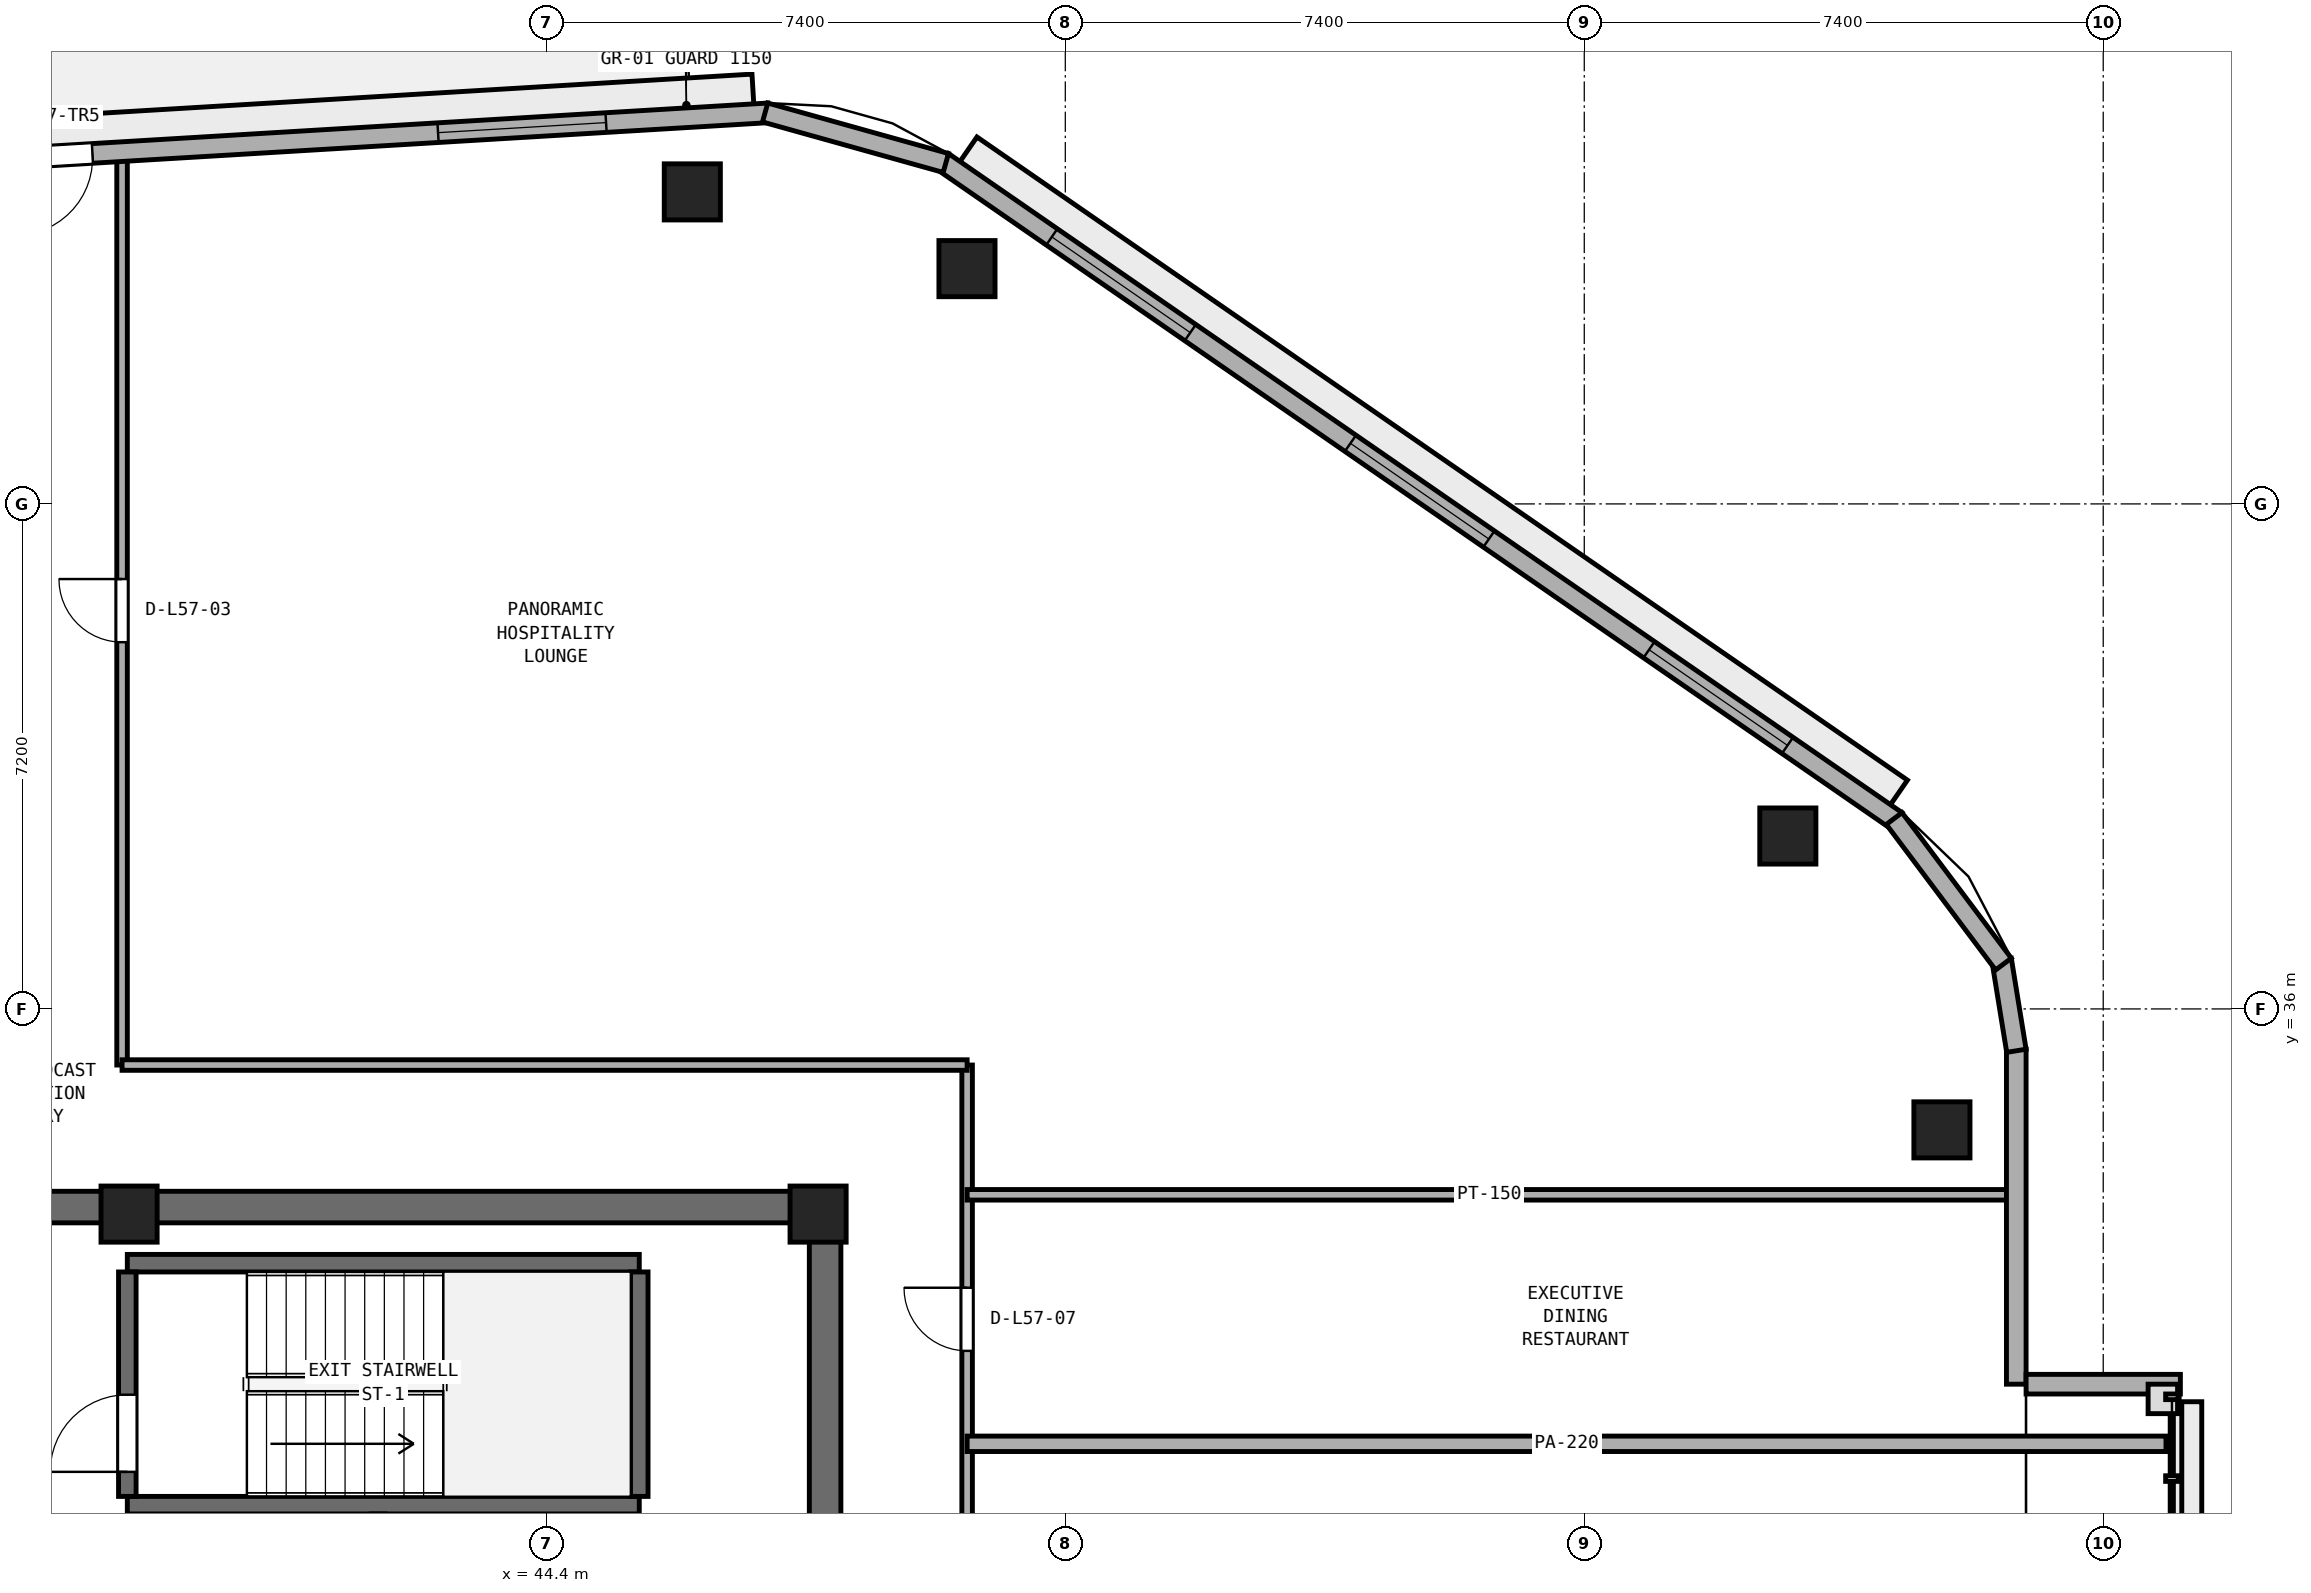
"""IFC4 building model, lengths in metres.
Left out: names, types, materials, properties, quantities, classifications, styles, units other than length and angle.
Written with IfcOpenShell. Run it as: python <this file> out.ifc"""

import sys

from ifc_helpers import new_model, si_unit, direction, frame, frame_2d, origin, origin_2d, place, context, subcontext, project, spatial, rectangle, extrude, element, fill, save


model = new_model("IFC4")
c1 = context("Model", 3, precision=1e-05, world=origin(), true_north=direction((0.0, 1.0)))
c2 = subcontext(c1, "Body", "Model", "MODEL_VIEW")
j1 = project(units=[si_unit("LENGTHUNIT", "METRE"), si_unit("PLANEANGLEUNIT", "RADIAN")], contexts=[c1])
p1 = place(None, origin())
s1 = spatial("IfcSite", under=j1, at=p1, CompositionType="ELEMENT")
p2 = place(p1, origin())
s2 = spatial("IfcBuilding", under=s1, at=p2, CompositionType="ELEMENT")
p3 = place(p2, frame((0.0, 0.0, 225.0)))
s3 = spatial("IfcBuildingStorey", under=s2, at=p3, CompositionType="ELEMENT", Elevation=225.0)
p4 = place(p3, frame((25.4, 33.175, 0.0), z_axis=(0.0, 0.0, 1.0), x_axis=(1.0, 0.0, 0.0)))
e1 = element("IfcWall", 1, at=p4, inside=s3, PredefinedType="SHEAR", context=c2, shape_type="SweptSolid", body=[
    extrude(rectangle(XDim=23.2, YDim=0.45, at=frame_2d((11.6, 0.0))), origin(), (0.0, 0.0, 1.0), 3.51),
])
p5 = place(p3, frame((48.375, 17.45, 0.0), z_axis=(0.0, 0.0, 1.0), x_axis=(0.0, 1.0, 0.0)))
e2 = element("IfcWall", 2, at=p5, inside=s3, PredefinedType="SHEAR", context=c2, shape_type="SweptSolid", body=[
    extrude(rectangle(XDim=15.5, YDim=0.45, at=frame_2d((7.75, 0.0))), origin(), (0.0, 0.0, 1.0), 3.51),
])
p6 = place(p5, frame((5.85, 0.0, 0.0)))
e3 = element("IfcOpeningElement", 3, at=p6, cuts=e2, PredefinedType="OPENING", context=c2, shape_type="SweptSolid", body=[
    extrude(rectangle(XDim=1.5, YDim=2.15, at=frame_2d((0.75, 1.075))), frame((0.0, 0.235, 0.0), z_axis=(0.0, -1.0, 0.0), x_axis=(1.0, 0.0, 0.0)), (0.0, 0.0, 1.0), 0.47),
])
for number, where, z_axis, x_axis in (
    (4, (48.275, 33.075, 0.0), (0.0, 0.0, 1.0), (1.0, 0.0, 0.0)),
    (5, (38.45, 33.075, 0.0), (0.0, 0.0, 1.0), (1.0, 0.0, 0.0)),
):
    element("IfcColumn", number, at=place(p3, frame(where, z_axis=z_axis, x_axis=x_axis)), inside=s3, PredefinedType="PILASTER", context=c2, shape_type="SweptSolid", body=[
        extrude(rectangle(XDim=0.8, YDim=0.8, at=origin_2d()), origin(), (0.0, 0.0, 1.0), 3.8),
    ])
for number, where, z_axis, x_axis in (
    (6, (64.3, 34.276, 0.0), (0.0, 0.0, 1.0), (1.0, 0.0, 0.0)),
    (7, (62.103, 38.465, 0.0), (0.0, 0.0, 1.0), (1.0, 0.0, 0.0)),
    (8, (50.398, 46.554, 0.0), (0.0, 0.0, 1.0), (1.0, 0.0, 0.0)),
    (9, (46.481, 47.648, 0.0), (0.0, 0.0, 1.0), (1.0, 0.0, 0.0)),
):
    element("IfcColumn", number, at=place(p3, frame(where, z_axis=z_axis, x_axis=x_axis)), inside=s3, PredefinedType="COLUMN", context=c2, shape_type="SweptSolid", body=[
        extrude(rectangle(XDim=0.8, YDim=0.8, at=origin_2d()), origin(), (0.0, 0.0, 1.0), 3.8),
    ])
for number, where, z_axis, x_axis in (
    (10, (38.425, 28.925, 0.0), (0.0, 0.0, 1.0), (1.0, 0.0, 0.0)),
    (11, (38.425, 32.375, 0.0), (0.0, 0.0, 1.0), (1.0, 0.0, 0.0)),
):
    element("IfcWall", number, at=place(p3, frame(where, z_axis=z_axis, x_axis=x_axis)), inside=s3, PredefinedType="SHEAR", context=c2, shape_type="SweptSolid", body=[
        extrude(rectangle(XDim=7.3, YDim=0.25, at=frame_2d((3.65, 0.0))), origin(), (0.0, 0.0, 1.0), 3.51),
    ])
p7 = place(p3, frame((38.425, 29.05, 0.0), z_axis=(0.0, 0.0, 1.0), x_axis=(0.0, 1.0, 0.0)))
e12 = element("IfcWall", 12, at=p7, inside=s3, PredefinedType="SHEAR", context=c2, shape_type="SweptSolid", body=[
    extrude(rectangle(XDim=3.2, YDim=0.25, at=frame_2d((1.6, 0.0))), origin(), (0.0, 0.0, 1.0), 3.51),
])
p8 = place(p7, frame((0.35, 0.0, 0.0)))
e13 = element("IfcOpeningElement", 13, at=p8, cuts=e12, PredefinedType="OPENING", context=c2, shape_type="SweptSolid", body=[
    extrude(rectangle(XDim=1.1, YDim=2.15, at=frame_2d((0.55, 1.075))), frame((0.0, 0.135, 0.0), z_axis=(0.0, -1.0, 0.0), x_axis=(1.0, 0.0, 0.0)), (0.0, 0.0, 1.0), 0.27),
])
p9 = place(p3, frame((45.725, 29.05, 0.0), z_axis=(0.0, 0.0, 1.0), x_axis=(0.0, 1.0, 0.0)))
e14 = element("IfcWall", 14, at=p9, inside=s3, PredefinedType="SHEAR", context=c2, shape_type="SweptSolid", body=[
    extrude(rectangle(XDim=3.2, YDim=0.25, at=frame_2d((1.6, 0.0))), origin(), (0.0, 0.0, 1.0), 3.51),
])
p10 = place(p3, frame((50.4, 22.6, 0.0), z_axis=(0.0, 0.0, 1.0), x_axis=(0.0, 1.0, 0.0)))
e15 = element("IfcWall", 15, at=p10, inside=s3, PredefinedType="PARTITIONING", context=c2, shape_type="SweptSolid", body=[
    extrude(rectangle(XDim=12.6, YDim=0.15, at=frame_2d((6.3, 0.0))), origin(), (0.0, 0.0, 1.0), 3.51),
])
p11 = place(p10, frame((3.22, 0.0, 0.0)))
e16 = element("IfcOpeningElement", 16, at=p11, cuts=e15, PredefinedType="OPENING", context=c2, shape_type="SweptSolid", body=[
    extrude(rectangle(XDim=1.0, YDim=2.12, at=frame_2d((0.5, 1.06))), frame((0.0, 0.085, 0.0), z_axis=(0.0, -1.0, 0.0), x_axis=(1.0, 0.0, 0.0)), (0.0, 0.0, 1.0), 0.17),
])
p12 = place(p10, frame((8.525, 0.0, 0.0)))
e17 = element("IfcOpeningElement", 17, at=p12, cuts=e15, PredefinedType="OPENING", context=c2, shape_type="SweptSolid", body=[
    extrude(rectangle(XDim=0.9, YDim=2.1, at=frame_2d((0.45, 1.05))), frame((0.0, 0.085, 0.0), z_axis=(0.0, -1.0, 0.0), x_axis=(1.0, 0.0, 0.0)), (0.0, 0.0, 1.0), 0.17),
])
p13 = place(p3, frame((38.35, 35.2, 0.0), z_axis=(0.0, 0.0, 1.0), x_axis=(0.0, 1.0, 0.0)))
e18 = element("IfcWall", 18, at=p13, inside=s3, PredefinedType="PARTITIONING", context=c2, shape_type="SweptSolid", body=[
    extrude(rectangle(XDim=12.958, YDim=0.15, at=frame_2d((6.479, 0.0))), origin(), (0.0, 0.0, 1.0), 3.51),
])
p14 = place(p13, frame((6.029, 0.0, 0.0)))
e19 = element("IfcOpeningElement", 19, at=p14, cuts=e18, PredefinedType="OPENING", context=c2, shape_type="SweptSolid", body=[
    extrude(rectangle(XDim=0.9, YDim=2.1, at=frame_2d((0.45, 1.05))), frame((0.0, 0.085, 0.0), z_axis=(0.0, -1.0, 0.0), x_axis=(1.0, 0.0, 0.0)), (0.0, 0.0, 1.0), 0.17),
])
p15 = place(p3, frame((50.4, 29.8, 0.0), z_axis=(0.0, 0.0, 1.0), x_axis=(1.0, 0.0, 0.0)))
e20 = element("IfcWall", 20, at=p15, inside=s3, PredefinedType="PARTITIONING", context=c2, shape_type="SweptSolid", body=[
    extrude(rectangle(XDim=17.095, YDim=0.22, at=frame_2d((8.548, 0.0))), origin(), (0.0, 0.0, 1.0), 3.51),
])
p16 = place(p3, frame((50.4, 33.35, 0.0), z_axis=(0.0, 0.0, 1.0), x_axis=(1.0, 0.0, 0.0)))
e21 = element("IfcWall", 21, at=p16, inside=s3, PredefinedType="PARTITIONING", context=c2, shape_type="SweptSolid", body=[
    extrude(rectangle(XDim=14.895, YDim=0.15, at=frame_2d((7.448, 0.0))), origin(), (0.0, 0.0, 1.0), 2.893),
])
p17 = place(p3, frame((38.35, 35.2, 0.0), z_axis=(0.0, 0.0, 1.0), x_axis=(1.0, 0.0, 0.0)))
e22 = element("IfcWall", 22, at=p17, inside=s3, PredefinedType="PARTITIONING", context=c2, shape_type="SweptSolid", body=[
    extrude(rectangle(XDim=12.05, YDim=0.15, at=frame_2d((6.025, 0.0))), origin(), (0.0, 0.0, 1.0), 3.51),
])
p18 = place(p3, frame((65.36, 30.65, 0.0), z_axis=(0.0, 0.0, 1.0), x_axis=(0.0, 1.0, 0.0)))
e23 = element("IfcWall", 23, at=p18, inside=s3, PredefinedType="STANDARD", context=c2, shape_type="SweptSolid", body=[
    extrude(rectangle(XDim=4.776, YDim=0.28, at=frame_2d((2.388, 0.0))), origin(), (0.0, 0.0, 1.0), 3.51),
])
p19 = place(p3, frame((63.651, 38.683, 0.0), z_axis=(0.0, 0.0, 1.0), x_axis=(-0.822655095, 0.568540759022, 0.0)))
e24 = element("IfcWall", 24, at=p19, inside=s3, PredefinedType="STANDARD", context=c2, shape_type="SweptSolid", body=[
    extrude(rectangle(XDim=16.528, YDim=0.28, at=frame_2d((8.264, 0.0))), origin(), (0.0, 0.0, 1.0), 3.51),
])
p20 = place(p19, frame((1.888, 0.0, 0.9)))
e25 = element("IfcOpeningElement", 25, at=p20, cuts=e24, PredefinedType="OPENING", context=c2, shape_type="SweptSolid", body=[
    extrude(rectangle(XDim=2.4, YDim=1.75, at=frame_2d((1.2, 0.875))), frame((0.0, 0.15, 0.0), z_axis=(0.0, -1.0, 0.0), x_axis=(1.0, 0.0, 0.0)), (0.0, 0.0, 1.0), 0.3),
])
p21 = place(p19, frame((7.064, 0.0, 0.9)))
e26 = element("IfcOpeningElement", 26, at=p21, cuts=e24, PredefinedType="OPENING", context=c2, shape_type="SweptSolid", body=[
    extrude(rectangle(XDim=2.4, YDim=1.75, at=frame_2d((1.2, 0.875))), frame((0.0, 0.15, 0.0), z_axis=(0.0, -1.0, 0.0), x_axis=(1.0, 0.0, 0.0)), (0.0, 0.0, 1.0), 0.3),
])
p22 = place(p19, frame((12.24, 0.0, 0.9)))
e27 = element("IfcOpeningElement", 27, at=p22, cuts=e24, PredefinedType="OPENING", context=c2, shape_type="SweptSolid", body=[
    extrude(rectangle(XDim=2.4, YDim=1.75, at=frame_2d((1.2, 0.875))), frame((0.0, 0.15, 0.0), z_axis=(0.0, -1.0, 0.0), x_axis=(1.0, 0.0, 0.0)), (0.0, 0.0, 1.0), 0.3),
])
p23 = place(p3, frame((47.566, 48.775, 0.0), z_axis=(0.0, 0.0, 1.0), x_axis=(-0.998202767485, -0.059926913695, 0.0)))
e28 = element("IfcWall", 28, at=p23, inside=s3, PredefinedType="STANDARD", context=c2, shape_type="SweptSolid", body=[
    extrude(rectangle(XDim=19.111, YDim=0.28, at=frame_2d((9.556, 0.0))), origin(), (0.0, 0.0, 1.0), 3.51),
])
p24 = place(p23, frame((9.656, 0.0, 0.0)))
e29 = element("IfcOpeningElement", 29, at=p24, cuts=e28, PredefinedType="OPENING", context=c2, shape_type="SweptSolid", body=[
    extrude(rectangle(XDim=1.1, YDim=2.2, at=frame_2d((0.55, 1.1))), frame((0.0, 0.15, 0.0), z_axis=(0.0, -1.0, 0.0), x_axis=(1.0, 0.0, 0.0)), (0.0, 0.0, 1.0), 0.3),
])
p25 = place(p23, frame((2.319, 0.0, 0.9)))
e30 = element("IfcOpeningElement", 30, at=p25, cuts=e28, PredefinedType="OPENING", context=c2, shape_type="SweptSolid", body=[
    extrude(rectangle(XDim=2.4, YDim=1.75, at=frame_2d((1.2, 0.875))), frame((0.0, 0.15, 0.0), z_axis=(0.0, -1.0, 0.0), x_axis=(1.0, 0.0, 0.0)), (0.0, 0.0, 1.0), 0.3),
])
p26 = place(p23, frame((14.392, 0.0, 0.9)))
e31 = element("IfcOpeningElement", 31, at=p26, cuts=e28, PredefinedType="OPENING", context=c2, shape_type="SweptSolid", body=[
    extrude(rectangle(XDim=2.4, YDim=1.75, at=frame_2d((1.2, 0.875))), frame((0.0, 0.15, 0.0), z_axis=(0.0, -1.0, 0.0), x_axis=(1.0, 0.0, 0.0)), (0.0, 0.0, 1.0), 0.3),
])
p27 = place(p3, frame((65.362, 35.403, 0.0), z_axis=(0.0, 0.0, 1.0), x_axis=(-0.160271674114, 0.987072940809, 0.0)))
e32 = element("IfcWall", 32, at=p27, inside=s3, PredefinedType="STANDARD", context=c2, shape_type="SweptSolid", body=[
    extrude(rectangle(XDim=1.315, YDim=0.28, at=frame_2d((0.657, 0.0))), origin(), (0.0, 0.0, 1.0), 3.51),
])
p28 = place(p3, frame((65.177, 36.639, 0.0), z_axis=(0.0, 0.0, 1.0), x_axis=(-0.600436386467, 0.799672524104, 0.0)))
e33 = element("IfcWall", 33, at=p28, inside=s3, PredefinedType="STANDARD", context=c2, shape_type="SweptSolid", body=[
    extrude(rectangle(XDim=2.595, YDim=0.28, at=frame_2d((1.298, 0.0))), origin(), (0.0, 0.0, 1.0), 3.51),
])
p29 = place(p3, frame((50.096, 48.061, 0.0), z_axis=(0.0, 0.0, 1.0), x_axis=(-0.963108887091, 0.269112005688, 0.0)))
e34 = element("IfcWall", 34, at=p29, inside=s3, PredefinedType="STANDARD", context=c2, shape_type="SweptSolid", body=[
    extrude(rectangle(XDim=2.675, YDim=0.28, at=frame_2d((1.338, 0.0))), origin(), (0.0, 0.0, 1.0), 3.51),
])
p30 = place(p3, frame((65.5, 30.65, 0.0), z_axis=(0.0, 0.0, 1.0), x_axis=(1.0, 0.0, 0.0)))
e35 = element("IfcWall", 35, at=p30, inside=s3, PredefinedType="STANDARD", context=c2, shape_type="SweptSolid", body=[
    extrude(rectangle(XDim=2.2, YDim=0.28, at=frame_2d((1.1, 0.0))), origin(), (0.0, 0.0, 1.0), 3.51),
])
p31 = place(p8, origin())
e36 = element("IfcDoor", 36, at=p31, inside=s3, OperationType="SINGLE_SWING_LEFT", PredefinedType="DOOR", context=c2, shape_type="SweptSolid", body=[
    extrude(rectangle(XDim=1.1, YDim=2.15, at=frame_2d((0.55, 1.075))), frame((0.0, 0.025, 0.0), z_axis=(0.0, -1.0, 0.0), x_axis=(1.0, 0.0, 0.0)), (0.0, 0.0, 1.0), 0.05),
])
fill(e13, e36)
p32 = place(p14, origin())
e37 = element("IfcDoor", 37, at=p32, inside=s3, OperationType="SINGLE_SWING_RIGHT", PredefinedType="DOOR", context=c2, shape_type="SweptSolid", body=[
    extrude(rectangle(XDim=0.9, YDim=2.1, at=frame_2d((0.45, 1.05))), frame((0.0, 0.025, 0.0), z_axis=(0.0, -1.0, 0.0), x_axis=(1.0, 0.0, 0.0)), (0.0, 0.0, 1.0), 0.05),
])
fill(e19, e37)
p33 = place(p12, origin())
e38 = element("IfcDoor", 38, at=p33, inside=s3, OperationType="SINGLE_SWING_RIGHT", PredefinedType="DOOR", context=c2, shape_type="SweptSolid", body=[
    extrude(rectangle(XDim=0.9, YDim=2.1, at=frame_2d((0.45, 1.05))), frame((0.0, 0.025, 0.0), z_axis=(0.0, -1.0, 0.0), x_axis=(1.0, 0.0, 0.0)), (0.0, 0.0, 1.0), 0.05),
])
fill(e17, e38)
p34 = place(p20, origin())
e39 = element("IfcWindow", 39, at=p34, inside=s3, PartitioningType="SINGLE_PANEL", PredefinedType="WINDOW", context=c2, shape_type="SweptSolid", body=[
    extrude(rectangle(XDim=2.4, YDim=1.75, at=frame_2d((1.2, 0.875))), frame((0.0, 0.03, 0.0), z_axis=(0.0, -1.0, 0.0), x_axis=(1.0, 0.0, 0.0)), (0.0, 0.0, 1.0), 0.06),
])
fill(e25, e39)
p35 = place(p21, origin())
e40 = element("IfcWindow", 40, at=p35, inside=s3, PartitioningType="SINGLE_PANEL", PredefinedType="WINDOW", context=c2, shape_type="SweptSolid", body=[
    extrude(rectangle(XDim=2.4, YDim=1.75, at=frame_2d((1.2, 0.875))), frame((0.0, 0.03, 0.0), z_axis=(0.0, -1.0, 0.0), x_axis=(1.0, 0.0, 0.0)), (0.0, 0.0, 1.0), 0.06),
])
fill(e26, e40)
p36 = place(p22, origin())
e41 = element("IfcWindow", 41, at=p36, inside=s3, PartitioningType="SINGLE_PANEL", PredefinedType="WINDOW", context=c2, shape_type="SweptSolid", body=[
    extrude(rectangle(XDim=2.4, YDim=1.75, at=frame_2d((1.2, 0.875))), frame((0.0, 0.03, 0.0), z_axis=(0.0, -1.0, 0.0), x_axis=(1.0, 0.0, 0.0)), (0.0, 0.0, 1.0), 0.06),
])
fill(e27, e41)
p37 = place(p24, origin())
e42 = element("IfcDoor", 42, at=p37, inside=s3, OperationType="SINGLE_SWING_RIGHT", PredefinedType="DOOR", context=c2, shape_type="SweptSolid", body=[
    extrude(rectangle(XDim=1.1, YDim=2.2, at=frame_2d((0.55, 1.1))), frame((0.0, 0.025, 0.0), z_axis=(0.0, -1.0, 0.0), x_axis=(1.0, 0.0, 0.0)), (0.0, 0.0, 1.0), 0.05),
])
fill(e29, e42)
p38 = place(p25, origin())
e43 = element("IfcWindow", 43, at=p38, inside=s3, PartitioningType="SINGLE_PANEL", PredefinedType="WINDOW", context=c2, shape_type="SweptSolid", body=[
    extrude(rectangle(XDim=2.4, YDim=1.75, at=frame_2d((1.2, 0.875))), frame((0.0, 0.03, 0.0), z_axis=(0.0, -1.0, 0.0), x_axis=(1.0, 0.0, 0.0)), (0.0, 0.0, 1.0), 0.06),
])
fill(e30, e43)
save(model, sys.argv[1])
